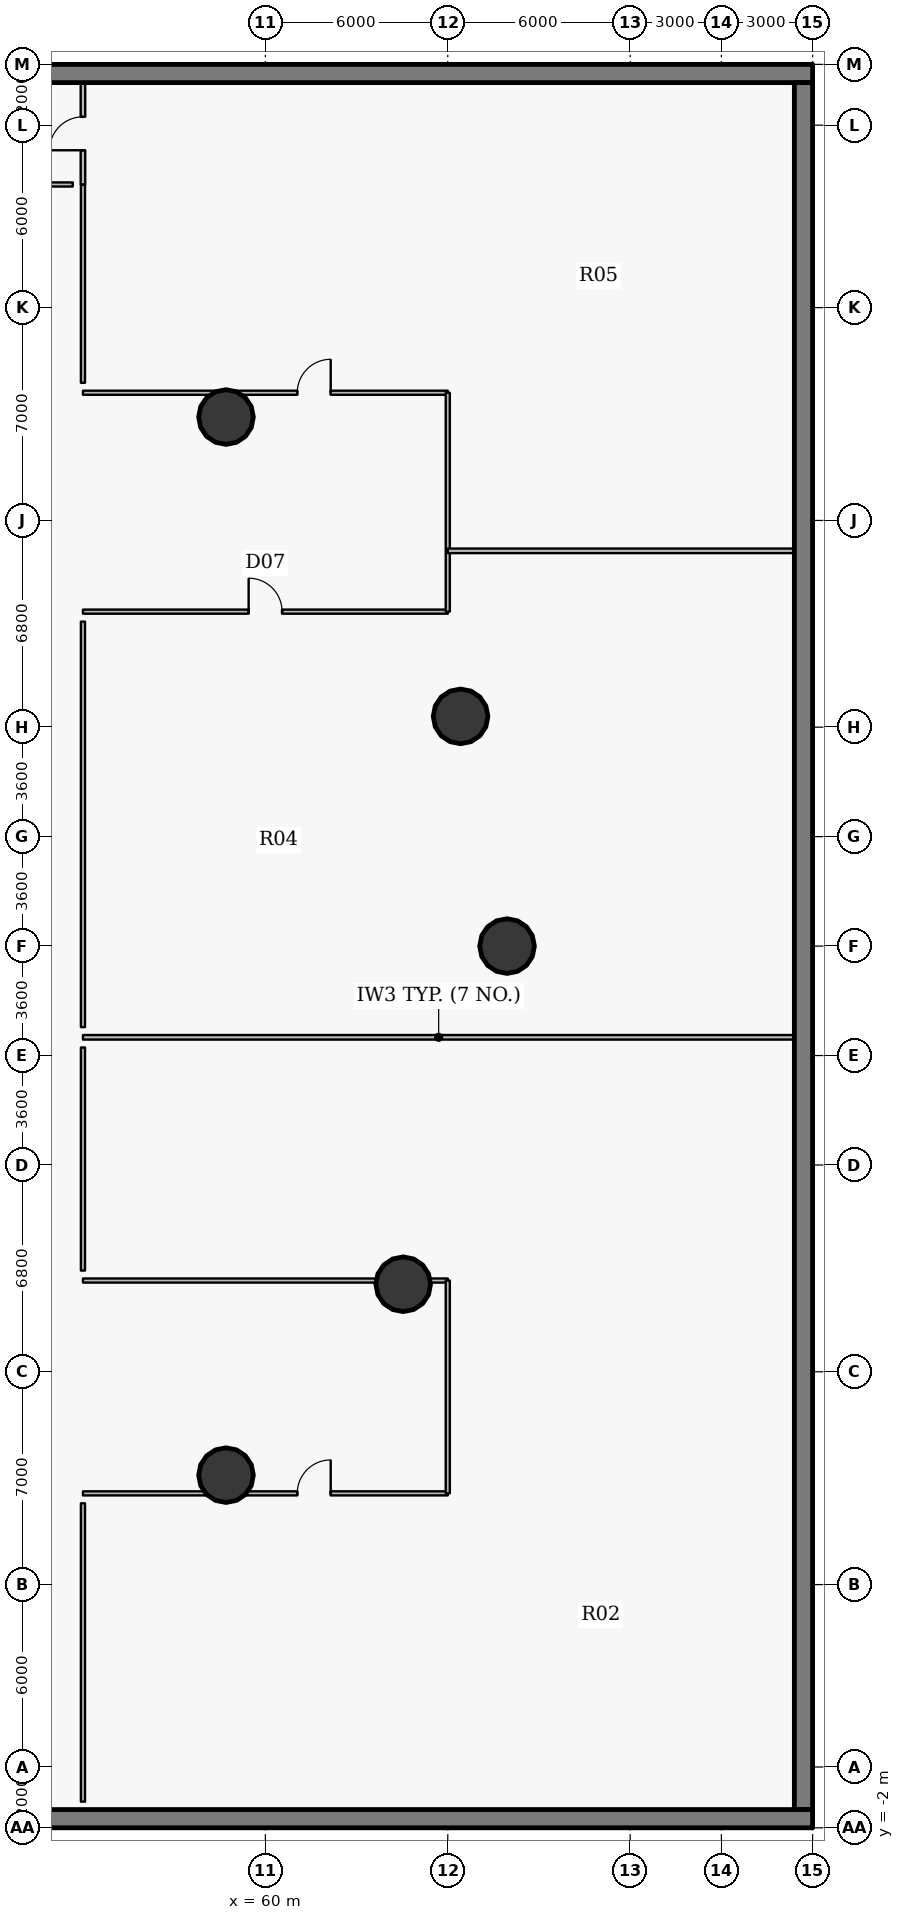
"""IFC4 building model, lengths in metres.
Left out: names, types, materials, properties, quantities, classifications, styles, units other than length and angle.
Written with IfcOpenShell. Run it as: python <this file> out.ifc"""

import sys

from ifc_helpers import new_model, si_unit, direction, frame, frame_2d, origin, origin_2d, place, context, subcontext, project, spatial, rectangle, hollow_circle, extrude, source, transform, mapped, element, fill, save


model = new_model("IFC4")
c1 = context("Model", 3, precision=1e-05, world=origin(), true_north=direction((0.0, 1.0)))
c2 = subcontext(c1, "Body", "Model", "MODEL_VIEW")
j1 = project(units=[si_unit("LENGTHUNIT", "METRE"), si_unit("PLANEANGLEUNIT", "RADIAN")], contexts=[c1])
p1 = place(None, origin())
s1 = spatial("IfcSite", under=j1, at=p1, CompositionType="ELEMENT")
p2 = place(p1, origin())
s2 = spatial("IfcBuilding", under=s1, at=p2, CompositionType="ELEMENT")
p3 = place(p2, frame((0.0, 0.0, -4.5)))
s3 = spatial("IfcBuildingStorey", under=s2, at=p3, CompositionType="ELEMENT", Elevation=-4.5)
p4 = place(p3, frame((-6.0, 55.7, 0.0), z_axis=(0.0, 0.0, 1.0), x_axis=(1.0, 0.0, 0.0)))
e1 = element("IfcWall", 1, at=p4, inside=s3, PredefinedType="SHEAR", context=c2, shape_type="SweptSolid", body=[
    extrude(rectangle(XDim=84.0, YDim=0.6, at=frame_2d((42.0, 0.0))), origin(), (0.0, 0.0, 1.0), 4.2),
])
p5 = place(p3, frame((77.7, 55.4, 0.0), z_axis=(0.0, 0.0, 1.0), x_axis=(0.0, -1.0, 0.0)))
e2 = element("IfcWall", 2, at=p5, inside=s3, PredefinedType="SHEAR", context=c2, shape_type="SweptSolid", body=[
    extrude(rectangle(XDim=56.8, YDim=0.6, at=frame_2d((28.4, 0.0))), origin(), (0.0, 0.0, 1.0), 4.2),
])
p6 = place(p3, frame((78.0, -1.7, 0.0), z_axis=(0.0, 0.0, 1.0), x_axis=(-1.0, 0.0, 0.0)))
e3 = element("IfcWall", 3, at=p6, inside=s3, PredefinedType="SHEAR", context=c2, shape_type="SweptSolid", body=[
    extrude(rectangle(XDim=84.0, YDim=0.6, at=frame_2d((42.0, 0.0))), origin(), (0.0, 0.0, 1.0), 4.2),
])
for number, where, z_axis, x_axis in (
    (4, (67.95, 27.0, 0.0), (0.0, 0.0, 1.0), (1.0, 0.0, 0.0)),
    (5, (66.42, 34.555, 0.0), (0.0, 0.0, 1.0), (1.0, 0.0, 0.0)),
    (6, (58.705, 44.401, 0.0), (0.0, 0.0, 1.0), (1.0, 0.0, 0.0)),
    (7, (58.705, 9.599, 0.0), (0.0, 0.0, 1.0), (1.0, 0.0, 0.0)),
    (8, (64.534, 15.878, 0.0), (0.0, 0.0, 1.0), (1.0, 0.0, 0.0)),
):
    element("IfcColumn", number, at=place(p3, frame(where, z_axis=z_axis, x_axis=x_axis)), inside=s3, PredefinedType="COLUMN", context=c2, shape_type="SweptSolid", body=[
        extrude(hollow_circle(Radius=0.9, WallThickness=0.05, at=origin_2d()), origin(), (0.0, 0.0, 1.0), 4.5),
    ])
p7 = place(p3, frame((54.0, 9.0, 0.0), z_axis=(0.0, 0.0, 1.0), x_axis=(1.0, 0.0, 0.0)))
e9 = element("IfcWall", 9, at=p7, inside=s3, PredefinedType="PARTITIONING", context=c2, shape_type="SweptSolid", body=[
    extrude(rectangle(XDim=12.0, YDim=0.135, at=frame_2d((6.0, 0.0))), origin(), (0.0, 0.0, 1.0), 3.385),
])
p8 = place(p7, frame((7.049, 0.0, 0.0)))
e10 = element("IfcOpeningElement", 10, at=p8, cuts=e9, PredefinedType="OPENING", context=c2, shape_type="SweptSolid", body=[
    extrude(rectangle(XDim=1.1, YDim=2.15, at=origin_2d()), frame((0.55, 0.078, 1.075), z_axis=(0.0, -1.0, 0.0), x_axis=(1.0, 0.0, 0.0)), (0.0, 0.0, 1.0), 0.155),
])
p9 = place(p3, frame((54.0, 16.0, 0.0), z_axis=(0.0, 0.0, 1.0), x_axis=(1.0, 0.0, 0.0)))
e11 = element("IfcWall", 11, at=p9, inside=s3, PredefinedType="PARTITIONING", context=c2, shape_type="SweptSolid", body=[
    extrude(rectangle(XDim=12.0, YDim=0.135, at=frame_2d((6.0, 0.0))), origin(), (0.0, 0.0, 1.0), 2.25),
])
p10 = place(p3, frame((54.0, 24.0, 0.0), z_axis=(0.0, 0.0, 1.0), x_axis=(1.0, 0.0, 0.0)))
e12 = element("IfcWall", 12, at=p10, inside=s3, PredefinedType="PARTITIONING", context=c2, shape_type="SweptSolid", body=[
    extrude(rectangle(XDim=23.4, YDim=0.15, at=frame_2d((11.7, 0.0))), origin(), (0.0, 0.0, 1.0), 2.25),
])
p11 = place(p3, frame((54.0, 38.0, 0.0), z_axis=(0.0, 0.0, 1.0), x_axis=(1.0, 0.0, 0.0)))
e13 = element("IfcWall", 13, at=p11, inside=s3, PredefinedType="PARTITIONING", context=c2, shape_type="SweptSolid", body=[
    extrude(rectangle(XDim=12.0, YDim=0.135, at=frame_2d((6.0, 0.0))), origin(), (0.0, 0.0, 1.0), 3.585),
])
p12 = place(p11, frame((5.45, 0.0, 0.0)))
e14 = element("IfcOpeningElement", 14, at=p12, cuts=e13, PredefinedType="OPENING", context=c2, shape_type="SweptSolid", body=[
    extrude(rectangle(XDim=1.1, YDim=2.15, at=origin_2d()), frame((0.55, 0.078, 1.075), z_axis=(0.0, -1.0, 0.0), x_axis=(1.0, 0.0, 0.0)), (0.0, 0.0, 1.0), 0.155),
])
p13 = place(p3, frame((54.0, 45.2, 0.0), z_axis=(0.0, 0.0, 1.0), x_axis=(1.0, 0.0, 0.0)))
e15 = element("IfcWall", 15, at=p13, inside=s3, PredefinedType="PARTITIONING", context=c2, shape_type="SweptSolid", body=[
    extrude(rectangle(XDim=12.0, YDim=0.135, at=frame_2d((6.0, 0.0))), origin(), (0.0, 0.0, 1.0), 3.385),
])
p14 = place(p13, frame((7.049, 0.0, 0.0)))
e16 = element("IfcOpeningElement", 16, at=p14, cuts=e15, PredefinedType="OPENING", context=c2, shape_type="SweptSolid", body=[
    extrude(rectangle(XDim=1.1, YDim=2.15, at=origin_2d()), frame((0.55, 0.078, 1.075), z_axis=(0.0, -1.0, 0.0), x_axis=(1.0, 0.0, 0.0)), (0.0, 0.0, 1.0), 0.155),
])
p15 = place(p3, frame((54.0, 52.05, 0.0), z_axis=(0.0, 0.0, 1.0), x_axis=(0.0, 1.0, 0.0)))
e17 = element("IfcWall", 17, at=p15, inside=s3, PredefinedType="PARTITIONING", context=c2, shape_type="SweptSolid", body=[
    extrude(rectangle(XDim=3.35, YDim=0.15, at=frame_2d((1.675, 0.0))), origin(), (0.0, 0.0, 1.0), 3.385),
])
p16 = place(p15, frame((1.125, 0.0, 0.0)))
e18 = element("IfcOpeningElement", 18, at=p16, cuts=e17, PredefinedType="OPENING", context=c2, shape_type="SweptSolid", body=[
    extrude(rectangle(XDim=1.1, YDim=2.15, at=origin_2d()), frame((0.55, 0.085, 1.075), z_axis=(0.0, -1.0, 0.0), x_axis=(1.0, 0.0, 0.0)), (0.0, 0.0, 1.0), 0.17),
])
p17 = place(p3, frame((66.0, 9.0, 0.0), z_axis=(0.0, 0.0, 1.0), x_axis=(0.0, 1.0, 0.0)))
e19 = element("IfcWall", 19, at=p17, inside=s3, PredefinedType="PARTITIONING", context=c2, shape_type="SweptSolid", body=[
    extrude(rectangle(XDim=7.0, YDim=0.135, at=frame_2d((3.5, 0.0))), origin(), (0.0, 0.0, 1.0), 3.385),
])
p18 = place(p3, frame((66.0, 38.0, 0.0), z_axis=(0.0, 0.0, 1.0), x_axis=(0.0, 1.0, 0.0)))
e20 = element("IfcWall", 20, at=p18, inside=s3, PredefinedType="PARTITIONING", context=c2, shape_type="SweptSolid", body=[
    extrude(rectangle(XDim=7.2, YDim=0.135, at=frame_2d((3.6, 0.0))), origin(), (0.0, 0.0, 1.0), 4.2),
])
p19 = place(p3, frame((66.0, 40.0, 0.0), z_axis=(0.0, 0.0, 1.0), x_axis=(1.0, 0.0, 0.0)))
e21 = element("IfcWall", 21, at=p19, inside=s3, PredefinedType="PARTITIONING", context=c2, shape_type="SweptSolid", body=[
    extrude(rectangle(XDim=11.4, YDim=0.15, at=frame_2d((5.7, 0.0))), origin(), (0.0, 0.0, 1.0), 4.2),
])
p20 = place(p3, frame((54.0, -1.14, 0.0), z_axis=(0.0, 0.0, 1.0), x_axis=(0.0, 1.0, 0.0)))
e22 = element("IfcWall", 22, at=p20, inside=s3, PredefinedType="PARTITIONING", context=c2, shape_type="SweptSolid", body=[
    extrude(rectangle(XDim=9.812, YDim=0.135, at=frame_2d((4.906, 0.0))), origin(), (0.0, 0.0, 1.0), 3.585),
])
p21 = place(p3, frame((54.0, 16.327, 0.0), z_axis=(0.0, 0.0, 1.0), x_axis=(0.0, 1.0, 0.0)))
e23 = element("IfcWall", 23, at=p21, inside=s3, PredefinedType="PARTITIONING", context=c2, shape_type="SweptSolid", body=[
    extrude(rectangle(XDim=7.338, YDim=0.135, at=frame_2d((3.669, 0.0))), origin(), (0.0, 0.0, 1.0), 2.25),
])
p22 = place(p3, frame((54.0, 24.335, 0.0), z_axis=(0.0, 0.0, 1.0), x_axis=(0.0, 1.0, 0.0)))
e24 = element("IfcWall", 24, at=p22, inside=s3, PredefinedType="PARTITIONING", context=c2, shape_type="SweptSolid", body=[
    extrude(rectangle(XDim=13.338, YDim=0.135, at=frame_2d((6.669, 0.0))), origin(), (0.0, 0.0, 1.0), 2.25),
])
p23 = place(p3, frame((54.0, 45.528, 0.0), z_axis=(0.0, 0.0, 1.0), x_axis=(0.0, 1.0, 0.0)))
e25 = element("IfcWall", 25, at=p23, inside=s3, PredefinedType="PARTITIONING", context=c2, shape_type="SweptSolid", body=[
    extrude(rectangle(XDim=6.512, YDim=0.135, at=frame_2d((3.256, 0.0))), origin(), (0.0, 0.0, 1.0), 4.2),
])
p24 = place(p3, frame((53.665, 52.05, 0.0), z_axis=(0.0, 0.0, 1.0), x_axis=(-1.0, 0.0, 0.0)))
e26 = element("IfcWall", 26, at=p24, inside=s3, PredefinedType="PARTITIONING", context=c2, shape_type="SweptSolid", body=[
    extrude(rectangle(XDim=30.665, YDim=0.135, at=frame_2d((15.333, 0.0))), origin(), (0.0, 0.0, 1.0), 3.385),
])
m1 = source(origin(), c2, "Body", "SweptSolid", [
    extrude(rectangle(XDim=1.1, YDim=2.15, at=origin_2d()), frame((0.55, 0.025, 1.075), z_axis=(0.0, -1.0, 0.0), x_axis=(1.0, 0.0, 0.0)), (0.0, 0.0, 1.0), 0.05),
])
p25 = place(p8, origin())
e27 = element("IfcDoor", 27, at=p25, inside=s3, OperationType="SINGLE_SWING_RIGHT", PredefinedType="DOOR", context=c2, shape_type="MappedRepresentation", body=[
    mapped(m1, transform((0.0, 0.0, 0.0), x_axis=(1.0, 0.0, 0.0), y_axis=(0.0, 1.0, 0.0), z_axis=(0.0, 0.0, 1.0), scale=1.0)),
])
fill(e10, e27)
p26 = place(p12, origin())
e28 = element("IfcDoor", 28, at=p26, inside=s3, OperationType="SINGLE_SWING_LEFT", PredefinedType="DOOR", context=c2, shape_type="MappedRepresentation", body=[
    mapped(m1, transform((0.0, 0.0, 0.0), x_axis=(1.0, 0.0, 0.0), y_axis=(0.0, 1.0, 0.0), z_axis=(0.0, 0.0, 1.0), scale=1.0)),
])
fill(e14, e28)
p27 = place(p14, origin())
e29 = element("IfcDoor", 29, at=p27, inside=s3, OperationType="SINGLE_SWING_RIGHT", PredefinedType="DOOR", context=c2, shape_type="MappedRepresentation", body=[
    mapped(m1, transform((0.0, 0.0, 0.0), x_axis=(1.0, 0.0, 0.0), y_axis=(0.0, 1.0, 0.0), z_axis=(0.0, 0.0, 1.0), scale=1.0)),
])
fill(e16, e29)
p28 = place(p16, origin())
e30 = element("IfcDoor", 30, at=p28, inside=s3, OperationType="SINGLE_SWING_LEFT", PredefinedType="DOOR", context=c2, shape_type="MappedRepresentation", body=[
    mapped(m1, transform((0.0, 0.0, 0.0), x_axis=(1.0, 0.0, 0.0), y_axis=(0.0, 1.0, 0.0), z_axis=(0.0, 0.0, 1.0), scale=1.0)),
])
fill(e18, e30)
save(model, sys.argv[1])
